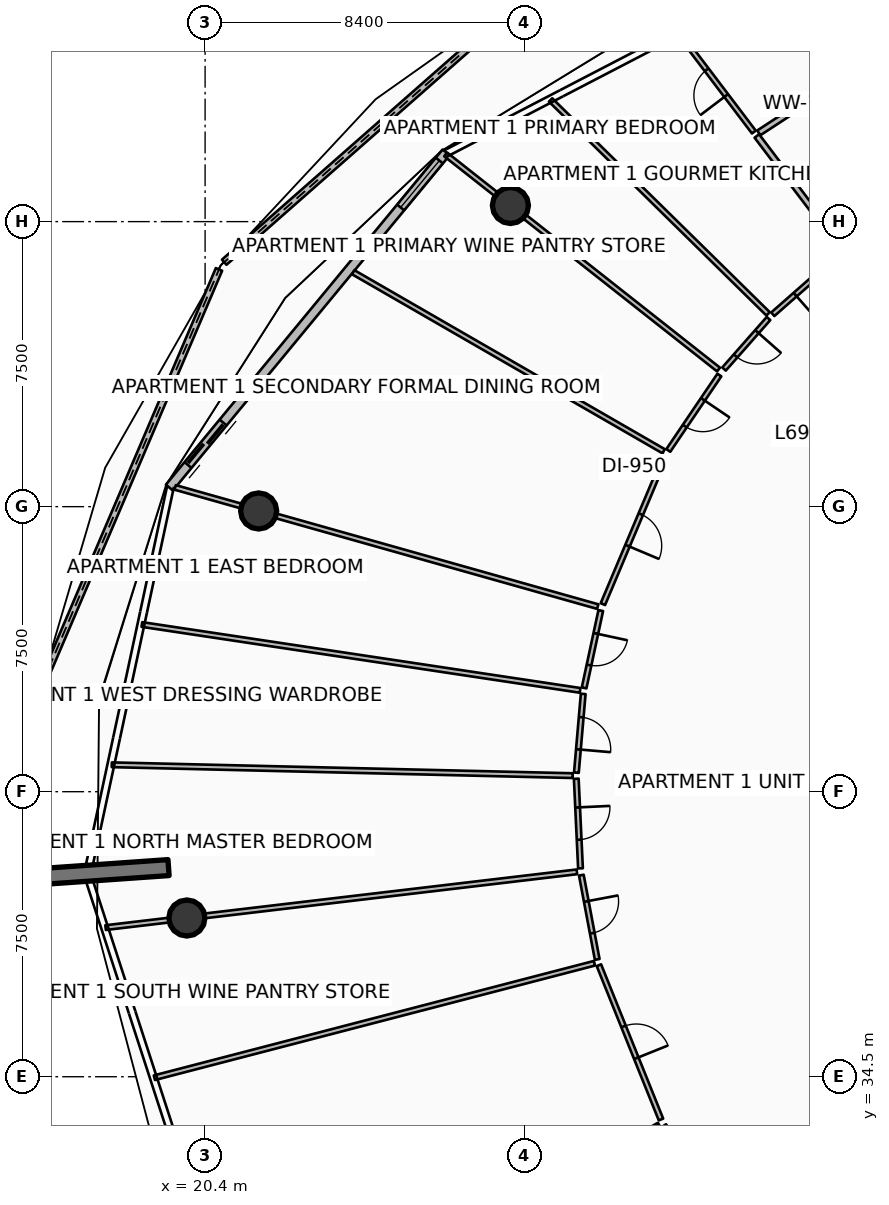
"""IFC4 building model, lengths in metres.
Left out: names, types, materials, properties, quantities, classifications, styles, units other than length and angle.
Written with IfcOpenShell. Run it as: python <this file> out.ifc"""

import sys

from ifc_helpers import new_model, si_unit, direction, frame, frame_2d, origin, origin_2d, place, context, subcontext, project, spatial, polyline, rectangle, circle, outline, extrude, element, fill, save


model = new_model("IFC4")
c1 = context("Model", 3, precision=1e-05, world=origin(), true_north=direction((0.0, 1.0)))
c2 = subcontext(c1, "Body", "Model", "MODEL_VIEW")
j1 = project(units=[si_unit("LENGTHUNIT", "METRE"), si_unit("PLANEANGLEUNIT", "RADIAN")], contexts=[c1])
p1 = place(None, origin())
s1 = spatial("IfcSite", under=j1, at=p1, CompositionType="ELEMENT")
p2 = place(p1, origin())
s2 = spatial("IfcBuilding", under=s1, at=p2, CompositionType="ELEMENT")
p3 = place(p2, frame((0.0, 0.0, 275.2)))
s3 = spatial("IfcBuildingStorey", under=s2, at=p3, CompositionType="ELEMENT", Elevation=275.2)
p4 = place(p3, frame((19.438, 40.003, 0.0), z_axis=(0.0, 0.0, 1.0), x_axis=(-0.997563824095, -0.069759707979, 0.0)))
e1 = element("IfcWall", 1, at=p4, inside=s3, PredefinedType="SOLIDWALL", context=c2, shape_type="SweptSolid", body=[
    extrude(rectangle(XDim=3.5, YDim=0.42, at=frame_2d((1.75, 0.0))), origin(), (0.0, 0.0, 1.0), 3.85),
])
for number, where, z_axis, x_axis in (
    (2, (28.434, 57.425, 0.0), (0.0, 0.0, 1.0), (1.0, 0.0, 0.0)),
    (3, (21.809, 49.387, 0.0), (0.0, 0.0, 1.0), (1.0, 0.0, 0.0)),
    (4, (19.92, 38.677, 0.0), (0.0, 0.0, 1.0), (1.0, 0.0, 0.0)),
):
    element("IfcColumn", number, at=place(p3, frame(where, z_axis=z_axis, x_axis=x_axis)), inside=s3, PredefinedType="COLUMN", context=c2, shape_type="SweptSolid", body=[
        extrude(circle(Radius=0.475, at=origin_2d()), origin(), (0.0, 0.0, 1.0), 3.59),
    ])
p5 = place(p3, frame((29.452, 63.451, 0.0), z_axis=(0.0, 0.0, 1.0), x_axis=(-0.750904489888, -0.660410816891, 0.0)))
e5 = element("IfcWall", 5, at=p5, inside=s3, PredefinedType="PARAPET", context=c2, shape_type="SweptSolid", body=[
    extrude(outline(polyline([(0.0, 0.0), (11.385, 0.0), (11.385, 1.348), (5.692, 1.562), (0.0, 1.747), (0.0, 0.0)])), frame((0.0, 0.09, 0.0), z_axis=(0.0, -1.0, 0.0), x_axis=(1.0, 0.0, 0.0)), (0.0, 0.0, 1.0), 0.18),
])
p6 = place(p3, frame((20.765, 55.742, 0.0), z_axis=(0.0, 0.0, 1.0), x_axis=(-0.392715313702, -0.919660090677, 0.0)))
e6 = element("IfcWall", 6, at=p6, inside=s3, PredefinedType="PARAPET", context=c2, shape_type="SweptSolid", body=[
    extrude(outline(polyline([(0.0, 0.0), (11.995, 0.0), (11.995, 1.12), (5.998, 1.182), (0.0, 1.348), (0.0, 0.0)])), frame((0.0, 0.09, 0.0), z_axis=(0.0, -1.0, 0.0), x_axis=(1.0, 0.0, 0.0)), (0.0, 0.0, 1.0), 0.18),
])
p7 = place(p3, frame((26.742, 58.822, 0.0), z_axis=(0.0, 0.0, 1.0), x_axis=(-0.636680093065, -0.771128043255, 0.0)))
e7 = element("IfcWall", 7, at=p7, inside=s3, PredefinedType="SOLIDWALL", context=c2, shape_type="SweptSolid", body=[
    extrude(rectangle(XDim=11.438, YDim=0.24, at=frame_2d((5.719, 0.0))), origin(), (0.0, 0.0, 1.0), 2.54),
])
p8 = place(p7, frame((9.218, 0.0, 0.0)))
e8 = element("IfcOpeningElement", 8, at=p8, cuts=e7, PredefinedType="OPENING", context=c2, shape_type="SweptSolid", body=[
    extrude(rectangle(XDim=1.45, YDim=2.15, at=frame_2d((0.725, 1.075))), frame((0.0, 0.13, 0.0), z_axis=(0.0, -1.0, 0.0), x_axis=(1.0, 0.0, 0.0)), (0.0, 0.0, 1.0), 0.26),
])
p9 = place(p7, frame((0.28, 0.0, 0.65)))
e9 = element("IfcOpeningElement", 9, at=p9, cuts=e7, PredefinedType="OPENING", context=c2, shape_type="SweptSolid", body=[
    extrude(rectangle(XDim=1.6, YDim=1.5, at=frame_2d((0.8, 0.75))), frame((0.0, 0.13, 0.0), z_axis=(0.0, -1.0, 0.0), x_axis=(1.0, 0.0, 0.0)), (0.0, 0.0, 1.0), 0.26),
])
p10 = place(p3, frame((39.233, 57.654, 0.0), z_axis=(0.0, 0.0, 1.0), x_axis=(-0.488631305502, 0.872490370883, 0.0)))
e10 = element("IfcWall", 10, at=p10, inside=s3, PredefinedType="PARTITIONING", context=c2, shape_type="SweptSolid", body=[
    extrude(rectangle(XDim=6.653, YDim=0.125, at=frame_2d((3.326, 0.0))), origin(), (0.0, 0.0, 1.0), 2.957),
])
p11 = place(p3, frame((37.317, 60.871, 0.0), z_axis=(0.0, 0.0, 1.0), x_axis=(-0.836665995214, -0.547713440087, 0.0)))
e11 = element("IfcWall", 11, at=p11, inside=s3, PredefinedType="PARTITIONING", context=c2, shape_type="SweptSolid", body=[
    extrude(rectangle(XDim=2.806, YDim=0.15, at=frame_2d((1.403, 0.0))), origin(), (0.0, 0.0, 1.0), 2.957),
])
p12 = place(p3, frame((37.166, 56.289, 0.0), z_axis=(0.0, 0.0, 1.0), x_axis=(-0.604171001441, 0.796854692537, 0.0)))
e12 = element("IfcWall", 12, at=p12, inside=s3, PredefinedType="PARTITIONING", context=c2, shape_type="SweptSolid", body=[
    extrude(rectangle(XDim=3.72, YDim=0.15, at=frame_2d((1.86, 0.0))), origin(), (0.0, 0.0, 1.0), 3.03),
])
p13 = place(p3, frame((34.84, 59.357, 0.0), z_axis=(0.0, 0.0, 1.0), x_axis=(-0.604173390314, 0.7968528813, 0.0)))
e13 = element("IfcWall", 13, at=p13, inside=s3, PredefinedType="PARTITIONING", context=c2, shape_type="SweptSolid", body=[
    extrude(rectangle(XDim=3.26, YDim=0.125, at=frame_2d((1.63, 0.0))), origin(), (0.0, 0.0, 1.0), 3.03),
])
p14 = place(p13, frame((1.205, 0.0, 0.0)))
e14 = element("IfcOpeningElement", 14, at=p14, cuts=e13, PredefinedType="OPENING", context=c2, shape_type="SweptSolid", body=[
    extrude(rectangle(XDim=0.85, YDim=2.06, at=frame_2d((0.425, 1.03))), frame((0.0, 0.073, 0.0), z_axis=(0.0, -1.0, 0.0), x_axis=(1.0, 0.0, 0.0)), (0.0, 0.0, 1.0), 0.145),
])
p15 = place(p3, frame((35.214, 54.573, 0.0), z_axis=(0.0, 0.0, 1.0), x_axis=(-0.712998082221, 0.701165982311, 0.0)))
e15 = element("IfcWall", 15, at=p15, inside=s3, PredefinedType="PARTITIONING", context=c2, shape_type="SweptSolid", body=[
    extrude(rectangle(XDim=8.027, YDim=0.125, at=frame_2d((4.013, 0.0))), origin(), (0.0, 0.0, 1.0), 3.03),
])
p16 = place(p3, frame((37.153, 56.158, 0.0), z_axis=(0.0, 0.0, 1.0), x_axis=(-0.750978090344, -0.660327121829, 0.0)))
e16 = element("IfcWall", 16, at=p16, inside=s3, PredefinedType="PARTITIONING", context=c2, shape_type="SweptSolid", body=[
    extrude(rectangle(XDim=2.416, YDim=0.125, at=frame_2d((1.208, 0.0))), origin(), (0.0, 0.0, 1.0), 3.03),
])
p17 = place(p16, frame((0.783, 0.0, 0.0)))
e17 = element("IfcOpeningElement", 17, at=p17, cuts=e16, PredefinedType="OPENING", context=c2, shape_type="SweptSolid", body=[
    extrude(rectangle(XDim=0.85, YDim=2.06, at=frame_2d((0.425, 1.03))), frame((0.0, 0.073, 0.0), z_axis=(0.0, -1.0, 0.0), x_axis=(1.0, 0.0, 0.0)), (0.0, 0.0, 1.0), 0.145),
])
p18 = place(p3, frame((35.226, 54.45, 0.0), z_axis=(0.0, 0.0, 1.0), x_axis=(-0.661115526194, -0.7502841202, 0.0)))
e18 = element("IfcWall", 18, at=p18, inside=s3, PredefinedType="PARTITIONING", context=c2, shape_type="SweptSolid", body=[
    extrude(rectangle(XDim=1.771, YDim=0.125, at=frame_2d((0.886, 0.0))), origin(), (0.0, 0.0, 1.0), 2.957),
])
p19 = place(p18, frame((0.461, 0.0, 0.0)))
e19 = element("IfcOpeningElement", 19, at=p19, cuts=e18, PredefinedType="OPENING", context=c2, shape_type="SweptSolid", body=[
    extrude(rectangle(XDim=0.85, YDim=2.06, at=frame_2d((0.425, 1.03))), frame((0.0, 0.073, 0.0), z_axis=(0.0, -1.0, 0.0), x_axis=(1.0, 0.0, 0.0)), (0.0, 0.0, 1.0), 0.145),
])
p20 = place(p3, frame((33.91, 53.108, 0.0), z_axis=(0.0, 0.0, 1.0), x_axis=(-0.785332331122, 0.619074413697, 0.0)))
e20 = element("IfcWall", 20, at=p20, inside=s3, PredefinedType="PARTITIONING", context=c2, shape_type="SweptSolid", body=[
    extrude(rectangle(XDim=9.143, YDim=0.125, at=frame_2d((4.571, 0.0))), origin(), (0.0, 0.0, 1.0), 2.957),
])
p21 = place(p3, frame((32.466, 50.958, 0.0), z_axis=(0.0, 0.0, 1.0), x_axis=(-0.86629721787, 0.499528908383, 0.0)))
e21 = element("IfcWall", 21, at=p21, inside=s3, PredefinedType="PARTITIONING", context=c2, shape_type="SweptSolid", body=[
    extrude(rectangle(XDim=9.428, YDim=0.125, at=frame_2d((4.714, 0.0))), origin(), (0.0, 0.0, 1.0), 3.03),
])
p22 = place(p3, frame((33.932, 52.963, 0.0), z_axis=(0.0, 0.0, 1.0), x_axis=(-0.560751274748, -0.82798430412, 0.0)))
e22 = element("IfcWall", 22, at=p22, inside=s3, PredefinedType="PARTITIONING", context=c2, shape_type="SweptSolid", body=[
    extrude(rectangle(XDim=2.396, YDim=0.125, at=frame_2d((1.198, 0.0))), origin(), (0.0, 0.0, 1.0), 2.957),
])
p23 = place(p22, frame((0.773, 0.0, 0.0)))
e23 = element("IfcOpeningElement", 23, at=p23, cuts=e22, PredefinedType="OPENING", context=c2, shape_type="SweptSolid", body=[
    extrude(rectangle(XDim=0.85, YDim=2.06, at=frame_2d((0.425, 1.03))), frame((0.0, 0.073, 0.0), z_axis=(0.0, -1.0, 0.0), x_axis=(1.0, 0.0, 0.0)), (0.0, 0.0, 1.0), 0.145),
])
p24 = place(p3, frame((32.513, 50.839, 0.0), z_axis=(0.0, 0.0, 1.0), x_axis=(-0.388494891754, -0.921450877194, 0.0)))
e24 = element("IfcWall", 24, at=p24, inside=s3, PredefinedType="PARTITIONING", context=c2, shape_type="SweptSolid", body=[
    extrude(rectangle(XDim=4.237, YDim=0.125, at=frame_2d((2.118, 0.0))), origin(), (0.0, 0.0, 1.0), 2.957),
])
p25 = place(p24, frame((1.668, 0.0, 0.0)))
e25 = element("IfcOpeningElement", 25, at=p25, cuts=e24, PredefinedType="OPENING", context=c2, shape_type="SweptSolid", body=[
    extrude(rectangle(XDim=0.9, YDim=2.08, at=frame_2d((0.45, 1.04))), frame((0.0, 0.073, 0.0), z_axis=(0.0, -1.0, 0.0), x_axis=(1.0, 0.0, 0.0)), (0.0, 0.0, 1.0), 0.145),
])
p26 = place(p3, frame((30.732, 46.87, 0.0), z_axis=(0.0, 0.0, 1.0), x_axis=(-0.962452931787, 0.271448621462, 0.0)))
e26 = element("IfcWall", 26, at=p26, inside=s3, PredefinedType="PARTITIONING", context=c2, shape_type="SweptSolid", body=[
    extrude(rectangle(XDim=11.554, YDim=0.125, at=frame_2d((5.777, 0.0))), origin(), (0.0, 0.0, 1.0), 2.957),
])
p27 = place(p3, frame((30.267, 44.666, 0.0), z_axis=(0.0, 0.0, 1.0), x_axis=(-0.988886077573, 0.148675235266, 0.0)))
e27 = element("IfcWall", 27, at=p27, inside=s3, PredefinedType="PARTITIONING", context=c2, shape_type="SweptSolid", body=[
    extrude(rectangle(XDim=11.661, YDim=0.125, at=frame_2d((5.83, 0.0))), origin(), (0.0, 0.0, 1.0), 3.03),
])
p28 = place(p3, frame((30.073, 42.423, 0.0), z_axis=(0.0, 0.0, 1.0), x_axis=(-0.999722774678, 0.023545143653, 0.0)))
e28 = element("IfcWall", 28, at=p28, inside=s3, PredefinedType="PARTITIONING", context=c2, shape_type="SweptSolid", body=[
    extrude(rectangle(XDim=12.132, YDim=0.125, at=frame_2d((6.066, 0.0))), origin(), (0.0, 0.0, 1.0), 3.03),
])
p29 = place(p3, frame((30.811, 46.765, 0.0), z_axis=(0.0, 0.0, 1.0), x_axis=(-0.210490523381, -0.977595897888, 0.0)))
e29 = element("IfcWall", 29, at=p29, inside=s3, PredefinedType="PARTITIONING", context=c2, shape_type="SweptSolid", body=[
    extrude(rectangle(XDim=2.081, YDim=0.125, at=frame_2d((1.041, 0.0))), origin(), (0.0, 0.0, 1.0), 2.957),
])
p30 = place(p29, frame((0.615, 0.0, 0.0)))
e30 = element("IfcOpeningElement", 30, at=p30, cuts=e29, PredefinedType="OPENING", context=c2, shape_type="SweptSolid", body=[
    extrude(rectangle(XDim=0.85, YDim=2.06, at=frame_2d((0.425, 1.03))), frame((0.0, 0.073, 0.0), z_axis=(0.0, -1.0, 0.0), x_axis=(1.0, 0.0, 0.0)), (0.0, 0.0, 1.0), 0.145),
])
p31 = place(p3, frame((30.349, 44.573, 0.0), z_axis=(0.0, 0.0, 1.0), x_axis=(-0.08623974721, -0.996274413001, 0.0)))
e31 = element("IfcWall", 31, at=p31, inside=s3, PredefinedType="PARTITIONING", context=c2, shape_type="SweptSolid", body=[
    extrude(rectangle(XDim=2.081, YDim=0.125, at=frame_2d((1.041, 0.0))), origin(), (0.0, 0.0, 1.0), 3.03),
])
p32 = place(p31, frame((0.615, 0.0, 0.0)))
e32 = element("IfcOpeningElement", 32, at=p32, cuts=e31, PredefinedType="OPENING", context=c2, shape_type="SweptSolid", body=[
    extrude(rectangle(XDim=0.85, YDim=2.06, at=frame_2d((0.425, 1.03))), frame((0.0, 0.073, 0.0), z_axis=(0.0, -1.0, 0.0), x_axis=(1.0, 0.0, 0.0)), (0.0, 0.0, 1.0), 0.145),
])
p33 = place(p3, frame((30.167, 42.341, 0.0), z_axis=(0.0, 0.0, 1.0), x_axis=(0.047063871423, -0.998891882041, 0.0)))
e33 = element("IfcWall", 33, at=p33, inside=s3, PredefinedType="PARTITIONING", context=c2, shape_type="SweptSolid", body=[
    extrude(rectangle(XDim=2.36, YDim=0.125, at=frame_2d((1.18, 0.0))), origin(), (0.0, 0.0, 1.0), 2.957),
])
p34 = place(p33, frame((0.755, 0.0, 0.0)))
e34 = element("IfcOpeningElement", 34, at=p34, cuts=e33, PredefinedType="OPENING", context=c2, shape_type="SweptSolid", body=[
    extrude(rectangle(XDim=0.85, YDim=2.06, at=frame_2d((0.425, 1.03))), frame((0.0, 0.073, 0.0), z_axis=(0.0, -1.0, 0.0), x_axis=(1.0, 0.0, 0.0)), (0.0, 0.0, 1.0), 0.145),
])
p35 = place(p3, frame((30.182, 39.891, 0.0), z_axis=(0.0, 0.0, 1.0), x_axis=(-0.993068421431, -0.117537697601, 0.0)))
e35 = element("IfcWall", 35, at=p35, inside=s3, PredefinedType="PARTITIONING", context=c2, shape_type="SweptSolid", body=[
    extrude(rectangle(XDim=12.488, YDim=0.125, at=frame_2d((6.244, 0.0))), origin(), (0.0, 0.0, 1.0), 2.957),
])
p36 = place(p3, frame((30.646, 37.486, 0.0), z_axis=(0.0, 0.0, 1.0), x_axis=(-0.967801832841, -0.251713353539, 0.0)))
e36 = element("IfcWall", 36, at=p36, inside=s3, PredefinedType="PARTITIONING", context=c2, shape_type="SweptSolid", body=[
    extrude(rectangle(XDim=11.966, YDim=0.125, at=frame_2d((5.983, 0.0))), origin(), (0.0, 0.0, 1.0), 3.03),
])
p37 = place(p3, frame((30.3, 39.805, 0.0), z_axis=(0.0, 0.0, 1.0), x_axis=(0.185013596113, -0.982735961107, 0.0)))
e37 = element("IfcWall", 37, at=p37, inside=s3, PredefinedType="PARTITIONING", context=c2, shape_type="SweptSolid", body=[
    extrude(rectangle(XDim=2.257, YDim=0.125, at=frame_2d((1.128, 0.0))), origin(), (0.0, 0.0, 1.0), 2.957),
])
p38 = place(p37, frame((0.703, 0.0, 0.0)))
e38 = element("IfcOpeningElement", 38, at=p38, cuts=e37, PredefinedType="OPENING", context=c2, shape_type="SweptSolid", body=[
    extrude(rectangle(XDim=0.85, YDim=2.06, at=frame_2d((0.425, 1.03))), frame((0.0, 0.073, 0.0), z_axis=(0.0, -1.0, 0.0), x_axis=(1.0, 0.0, 0.0)), (0.0, 0.0, 1.0), 0.145),
])
p39 = place(p3, frame((30.762, 37.434, 0.0), z_axis=(0.0, 0.0, 1.0), x_axis=(0.373208088993, -0.927747660903, 0.0)))
e39 = element("IfcWall", 39, at=p39, inside=s3, PredefinedType="PARTITIONING", context=c2, shape_type="SweptSolid", body=[
    extrude(rectangle(XDim=4.376, YDim=0.125, at=frame_2d((2.188, 0.0))), origin(), (0.0, 0.0, 1.0), 2.957),
])
p40 = place(p39, frame((1.738, 0.0, 0.0)))
e40 = element("IfcOpeningElement", 40, at=p40, cuts=e39, PredefinedType="OPENING", context=c2, shape_type="SweptSolid", body=[
    extrude(rectangle(XDim=0.9, YDim=2.08, at=frame_2d((0.45, 1.04))), frame((0.0, 0.073, 0.0), z_axis=(0.0, -1.0, 0.0), x_axis=(1.0, 0.0, 0.0)), (0.0, 0.0, 1.0), 0.145),
])
p41 = place(p3, frame((32.346, 33.233, 0.0), z_axis=(0.0, 0.0, 1.0), x_axis=(-0.872495014167, -0.488623014454, 0.0)))
e41 = element("IfcWall", 41, at=p41, inside=s3, PredefinedType="PARTITIONING", context=c2, shape_type="SweptSolid", body=[
    extrude(rectangle(XDim=12.488, YDim=0.125, at=frame_2d((6.244, 0.0))), origin(), (0.0, 0.0, 1.0), 2.957),
])
p42 = place(p3, frame((32.477, 33.215, 0.0), z_axis=(0.0, 0.0, 1.0), x_axis=(0.550682631302, -0.834714705502, 0.0)))
e42 = element("IfcWall", 42, at=p42, inside=s3, PredefinedType="PARTITIONING", context=c2, shape_type="SweptSolid", body=[
    extrude(rectangle(XDim=2.43, YDim=0.125, at=frame_2d((1.215, 0.0))), origin(), (0.0, 0.0, 1.0), 2.957),
])
p43 = place(p42, frame((0.79, 0.0, 0.0)))
e43 = element("IfcOpeningElement", 43, at=p43, cuts=e42, PredefinedType="OPENING", context=c2, shape_type="SweptSolid", body=[
    extrude(rectangle(XDim=0.85, YDim=2.06, at=frame_2d((0.425, 1.03))), frame((0.0, 0.073, 0.0), z_axis=(0.0, -1.0, 0.0), x_axis=(1.0, 0.0, 0.0)), (0.0, 0.0, 1.0), 0.145),
])
p44 = place(p8, origin())
e44 = element("IfcDoor", 44, at=p44, inside=s3, OperationType="DOUBLE_DOOR_SLIDING", PredefinedType="DOOR", context=c2, shape_type="SweptSolid", body=[
    extrude(rectangle(XDim=1.45, YDim=2.15, at=frame_2d((0.725, 1.075))), frame((0.0, 0.025, 0.0), z_axis=(0.0, -1.0, 0.0), x_axis=(1.0, 0.0, 0.0)), (0.0, 0.0, 1.0), 0.05),
])
fill(e8, e44)
p45 = place(p9, origin())
e45 = element("IfcWindow", 45, at=p45, inside=s3, PartitioningType="SINGLE_PANEL", PredefinedType="WINDOW", context=c2, shape_type="SweptSolid", body=[
    extrude(rectangle(XDim=1.6, YDim=1.5, at=frame_2d((0.8, 0.75))), frame((0.0, 0.03, 0.0), z_axis=(0.0, -1.0, 0.0), x_axis=(1.0, 0.0, 0.0)), (0.0, 0.0, 1.0), 0.06),
])
fill(e9, e45)
p46 = place(p14, origin())
e46 = element("IfcDoor", 46, at=p46, inside=s3, OperationType="SINGLE_SWING_LEFT", PredefinedType="DOOR", context=c2, shape_type="SweptSolid", body=[
    extrude(rectangle(XDim=0.85, YDim=2.06, at=frame_2d((0.425, 1.03))), frame((0.0, 0.025, 0.0), z_axis=(0.0, -1.0, 0.0), x_axis=(1.0, 0.0, 0.0)), (0.0, 0.0, 1.0), 0.05),
])
fill(e14, e46)
p47 = place(p17, origin())
e47 = element("IfcDoor", 47, at=p47, inside=s3, OperationType="SINGLE_SWING_RIGHT", PredefinedType="DOOR", context=c2, shape_type="SweptSolid", body=[
    extrude(rectangle(XDim=0.85, YDim=2.06, at=frame_2d((0.425, 1.03))), frame((0.0, 0.025, 0.0), z_axis=(0.0, -1.0, 0.0), x_axis=(1.0, 0.0, 0.0)), (0.0, 0.0, 1.0), 0.05),
])
fill(e17, e47)
p48 = place(p19, origin())
e48 = element("IfcDoor", 48, at=p48, inside=s3, OperationType="SINGLE_SWING_LEFT", PredefinedType="DOOR", context=c2, shape_type="SweptSolid", body=[
    extrude(rectangle(XDim=0.85, YDim=2.06, at=frame_2d((0.425, 1.03))), frame((0.0, 0.025, 0.0), z_axis=(0.0, -1.0, 0.0), x_axis=(1.0, 0.0, 0.0)), (0.0, 0.0, 1.0), 0.05),
])
fill(e19, e48)
p49 = place(p23, origin())
e49 = element("IfcDoor", 49, at=p49, inside=s3, OperationType="SINGLE_SWING_LEFT", PredefinedType="DOOR", context=c2, shape_type="SweptSolid", body=[
    extrude(rectangle(XDim=0.85, YDim=2.06, at=frame_2d((0.425, 1.03))), frame((0.0, 0.025, 0.0), z_axis=(0.0, -1.0, 0.0), x_axis=(1.0, 0.0, 0.0)), (0.0, 0.0, 1.0), 0.05),
])
fill(e23, e49)
p50 = place(p25, origin())
e50 = element("IfcDoor", 50, at=p50, inside=s3, OperationType="SINGLE_SWING_RIGHT", PredefinedType="DOOR", context=c2, shape_type="SweptSolid", body=[
    extrude(rectangle(XDim=0.9, YDim=2.08, at=frame_2d((0.45, 1.04))), frame((0.0, 0.025, 0.0), z_axis=(0.0, -1.0, 0.0), x_axis=(1.0, 0.0, 0.0)), (0.0, 0.0, 1.0), 0.05),
])
fill(e25, e50)
p51 = place(p30, origin())
e51 = element("IfcDoor", 51, at=p51, inside=s3, OperationType="SINGLE_SWING_LEFT", PredefinedType="DOOR", context=c2, shape_type="SweptSolid", body=[
    extrude(rectangle(XDim=0.85, YDim=2.06, at=frame_2d((0.425, 1.03))), frame((0.0, 0.025, 0.0), z_axis=(0.0, -1.0, 0.0), x_axis=(1.0, 0.0, 0.0)), (0.0, 0.0, 1.0), 0.05),
])
fill(e30, e51)
p52 = place(p32, origin())
e52 = element("IfcDoor", 52, at=p52, inside=s3, OperationType="SINGLE_SWING_RIGHT", PredefinedType="DOOR", context=c2, shape_type="SweptSolid", body=[
    extrude(rectangle(XDim=0.85, YDim=2.06, at=frame_2d((0.425, 1.03))), frame((0.0, 0.025, 0.0), z_axis=(0.0, -1.0, 0.0), x_axis=(1.0, 0.0, 0.0)), (0.0, 0.0, 1.0), 0.05),
])
fill(e32, e52)
p53 = place(p34, origin())
e53 = element("IfcDoor", 53, at=p53, inside=s3, OperationType="SINGLE_SWING_LEFT", PredefinedType="DOOR", context=c2, shape_type="SweptSolid", body=[
    extrude(rectangle(XDim=0.85, YDim=2.06, at=frame_2d((0.425, 1.03))), frame((0.0, 0.025, 0.0), z_axis=(0.0, -1.0, 0.0), x_axis=(1.0, 0.0, 0.0)), (0.0, 0.0, 1.0), 0.05),
])
fill(e34, e53)
p54 = place(p38, origin())
e54 = element("IfcDoor", 54, at=p54, inside=s3, OperationType="SINGLE_SWING_LEFT", PredefinedType="DOOR", context=c2, shape_type="SweptSolid", body=[
    extrude(rectangle(XDim=0.85, YDim=2.06, at=frame_2d((0.425, 1.03))), frame((0.0, 0.025, 0.0), z_axis=(0.0, -1.0, 0.0), x_axis=(1.0, 0.0, 0.0)), (0.0, 0.0, 1.0), 0.05),
])
fill(e38, e54)
p55 = place(p40, origin())
e55 = element("IfcDoor", 55, at=p55, inside=s3, OperationType="SINGLE_SWING_RIGHT", PredefinedType="DOOR", context=c2, shape_type="SweptSolid", body=[
    extrude(rectangle(XDim=0.9, YDim=2.08, at=frame_2d((0.45, 1.04))), frame((0.0, 0.025, 0.0), z_axis=(0.0, -1.0, 0.0), x_axis=(1.0, 0.0, 0.0)), (0.0, 0.0, 1.0), 0.05),
])
fill(e40, e55)
save(model, sys.argv[1])
